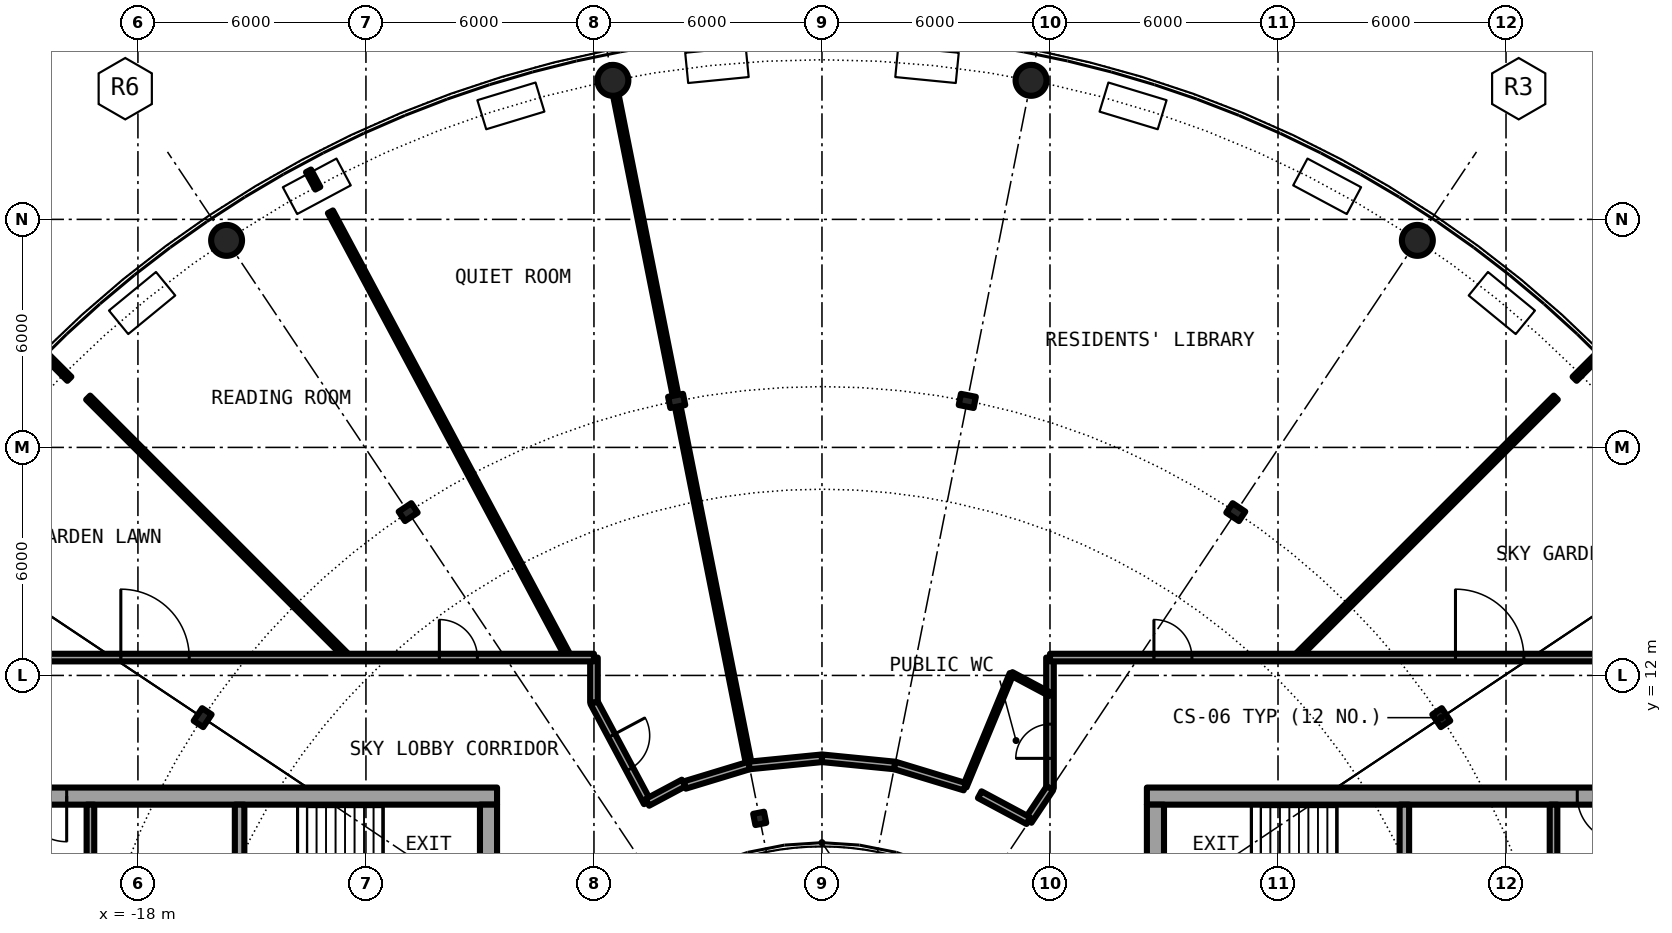
"""IFC4 building model, lengths in metres.
Left out: names, types, materials, properties, quantities, classifications, styles, units other than length and angle.
Written with IfcOpenShell. Run it as: python <this file> out.ifc"""

import sys

from ifc_helpers import new_model, si_unit, direction, frame, frame_2d, origin, origin_2d, place, context, subcontext, project, spatial, rectangle, hollow_circle, i_section, extrude, element, fill, save


model = new_model("IFC4")
c1 = context("Model", 3, precision=1e-05, world=origin(), true_north=direction((0.0, 1.0)))
c2 = subcontext(c1, "Body", "Model", "MODEL_VIEW")
j1 = project(units=[si_unit("LENGTHUNIT", "METRE"), si_unit("PLANEANGLEUNIT", "RADIAN")], contexts=[c1])
p1 = place(None, origin())
s1 = spatial("IfcSite", under=j1, at=p1, CompositionType="ELEMENT")
p2 = place(p1, origin())
s2 = spatial("IfcBuilding", under=s1, at=p2, CompositionType="ELEMENT")
p3 = place(p2, frame((0.0, 0.0, 221.85)))
s3 = spatial("IfcBuildingStorey", under=s2, at=p3, CompositionType="ELEMENT", Elevation=221.85)
for number, where, z_axis, x_axis in (
    (1, (15.667, 23.448, 0.0), (0.0, 0.0, 1.0), (1.0, 0.0, 0.0)),
    (2, (5.501, 27.658, 0.0), (0.0, 0.0, 1.0), (1.0, 0.0, 0.0)),
    (3, (-5.501, 27.658, 0.0), (0.0, 0.0, 1.0), (1.0, 0.0, 0.0)),
    (4, (-15.667, 23.448, 0.0), (0.0, 0.0, 1.0), (1.0, 0.0, 0.0)),
):
    element("IfcColumn", number, at=place(p3, frame(where, z_axis=z_axis, x_axis=x_axis)), inside=s3, PredefinedType="COLUMN", context=c2, shape_type="SweptSolid", body=[
        extrude(hollow_circle(Radius=0.406, WallThickness=0.03, at=origin_2d()), origin(), (0.0, 0.0, 1.0), 6.1),
    ])
for number, where, z_axis, x_axis in (
    (5, (16.297, 10.889, 0.0), (0.0, 0.0, 1.0), (0.831, 0.556, 0.0)),
    (6, (10.889, 16.297, 0.0), (0.0, 0.0, 1.0), (0.556, 0.831, 0.0)),
    (7, (3.824, 19.223, 0.0), (0.0, 0.0, 1.0), (0.195, 0.981, 0.0)),
    (8, (-3.824, 19.223, 0.0), (0.0, 0.0, 1.0), (-0.195, 0.981, 0.0)),
    (9, (-10.889, 16.297, 0.0), (0.0, 0.0, 1.0), (-0.556, 0.831, 0.0)),
    (10, (-16.297, 10.889, 0.0), (0.0, 0.0, 1.0), (-0.831, 0.556, 0.0)),
):
    element("IfcColumn", number, at=place(p3, frame(where, z_axis=z_axis, x_axis=x_axis)), inside=s3, PredefinedType="COLUMN", context=c2, shape_type="SweptSolid", body=[
        extrude(i_section(OverallWidth=0.3, OverallDepth=0.4, WebThickness=0.013, FlangeThickness=0.024, FilletRadius=0.027, at=origin_2d()), origin(), (0.0, 0.0, 1.0), 6.1),
    ])
p4 = place(p3, frame((-1.639, 8.239, 0.0), z_axis=(0.0, 0.0, 1.0), x_axis=(-0.195090322016, 0.980785280403, 0.0)))
e11 = element("IfcColumn", 11, at=p4, inside=s3, PredefinedType="COLUMN", context=c2, shape_type="SweptSolid", body=[
    extrude(i_section(OverallWidth=0.3, OverallDepth=0.29, WebThickness=0.009, FlangeThickness=0.014, FilletRadius=0.027, at=origin_2d()), origin(), (0.0, 0.0, 1.0), 6.1),
])
p5 = place(p3, frame((22.05, 8.825, 0.0), z_axis=(0.0, 0.0, 1.0), x_axis=(-1.0, 0.0, 0.0)))
e12 = element("IfcWall", 12, at=p5, inside=s3, PredefinedType="SHEAR", context=c2, shape_type="SweptSolid", body=[
    extrude(rectangle(XDim=13.5, YDim=0.45, at=frame_2d((6.75, 0.0))), origin(), (0.0, 0.0, 1.0), 6.1),
])
p6 = place(p5, frame((0.975, 0.0, 0.0)))
e13 = element("IfcOpeningElement", 13, at=p6, cuts=e12, PredefinedType="OPENING", context=c2, shape_type="SweptSolid", body=[
    extrude(rectangle(XDim=1.2, YDim=2.3, at=frame_2d((0.6, 1.15))), frame((0.0, 0.235, 0.0), z_axis=(0.0, -1.0, 0.0), x_axis=(1.0, 0.0, 0.0)), (0.0, 0.0, 1.0), 0.47),
])
p7 = place(p3, frame((8.775, -8.6, 0.0), z_axis=(0.0, 0.0, 1.0), x_axis=(0.0, 1.0, 0.0)))
e14 = element("IfcWall", 14, at=p7, inside=s3, PredefinedType="SHEAR", context=c2, shape_type="SweptSolid", body=[
    extrude(rectangle(XDim=17.2, YDim=0.45, at=frame_2d((8.6, 0.0))), origin(), (0.0, 0.0, 1.0), 6.1),
])
p8 = place(p7, frame((7.4, 0.0, 0.1)))
e15 = element("IfcOpeningElement", 15, at=p8, cuts=e14, PredefinedType="OPENING", context=c2, shape_type="SweptSolid", body=[
    extrude(rectangle(XDim=2.4, YDim=2.2, at=frame_2d((1.2, 1.1))), frame((0.0, 0.235, 0.0), z_axis=(0.0, -1.0, 0.0), x_axis=(1.0, 0.0, 0.0)), (0.0, 0.0, 1.0), 0.47),
])
p9 = place(p3, frame((15.325, 4.65, 0.0), z_axis=(0.0, 0.0, 1.0), x_axis=(0.0, 1.0, 0.0)))
e16 = element("IfcWall", 16, at=p9, inside=s3, PredefinedType="SHEAR", context=c2, shape_type="SweptSolid", body=[
    extrude(rectangle(XDim=3.95, YDim=0.25, at=frame_2d((1.975, 0.0))), origin(), (0.0, 0.0, 1.0), 6.1),
])
p10 = place(p9, frame((1.375, 0.0, 0.0)))
e17 = element("IfcOpeningElement", 17, at=p10, cuts=e16, PredefinedType="OPENING", context=c2, shape_type="SweptSolid", body=[
    extrude(rectangle(XDim=1.2, YDim=2.3, at=frame_2d((0.6, 1.15))), frame((0.0, 0.135, 0.0), z_axis=(0.0, -1.0, 0.0), x_axis=(1.0, 0.0, 0.0)), (0.0, 0.0, 1.0), 0.27),
])
p11 = place(p3, frame((19.25, 1.575, 0.0), z_axis=(0.0, 0.0, 1.0), x_axis=(0.0, 1.0, 0.0)))
e18 = element("IfcWall", 18, at=p11, inside=s3, PredefinedType="SOLIDWALL", context=c2, shape_type="SweptSolid", body=[
    extrude(rectangle(XDim=7.025, YDim=0.2, at=frame_2d((3.513, 0.0))), origin(), (0.0, 0.0, 1.0), 5.75),
])
p12 = place(p11, frame((4.475, 0.0, 0.0)))
e19 = element("IfcOpeningElement", 19, at=p12, cuts=e18, PredefinedType="OPENING", context=c2, shape_type="SweptSolid", body=[
    extrude(rectangle(XDim=1.1, YDim=2.3, at=frame_2d((0.55, 1.15))), frame((0.0, 0.11, 0.0), z_axis=(0.0, -1.0, 0.0), x_axis=(1.0, 0.0, 0.0)), (0.0, 0.0, 1.0), 0.22),
])
p13 = place(p3, frame((-8.55, 8.825, 0.0), z_axis=(0.0, 0.0, 1.0), x_axis=(-1.0, 0.0, 0.0)))
e20 = element("IfcWall", 20, at=p13, inside=s3, PredefinedType="SHEAR", context=c2, shape_type="SweptSolid", body=[
    extrude(rectangle(XDim=13.5, YDim=0.45, at=frame_2d((6.75, 0.0))), origin(), (0.0, 0.0, 1.0), 6.1),
])
p14 = place(p13, frame((11.325, 0.0, 0.0)))
e21 = element("IfcOpeningElement", 21, at=p14, cuts=e20, PredefinedType="OPENING", context=c2, shape_type="SweptSolid", body=[
    extrude(rectangle(XDim=1.2, YDim=2.3, at=frame_2d((0.6, 1.15))), frame((0.0, 0.235, 0.0), z_axis=(0.0, -1.0, 0.0), x_axis=(1.0, 0.0, 0.0)), (0.0, 0.0, 1.0), 0.47),
])
p15 = place(p3, frame((-8.775, 8.6, 0.0), z_axis=(0.0, 0.0, 1.0), x_axis=(0.0, -1.0, 0.0)))
e22 = element("IfcWall", 22, at=p15, inside=s3, PredefinedType="SHEAR", context=c2, shape_type="SweptSolid", body=[
    extrude(rectangle(XDim=17.2, YDim=0.45, at=frame_2d((8.6, 0.0))), origin(), (0.0, 0.0, 1.0), 6.1),
])
p16 = place(p15, frame((7.4, 0.0, 0.1)))
e23 = element("IfcOpeningElement", 23, at=p16, cuts=e22, PredefinedType="OPENING", context=c2, shape_type="SweptSolid", body=[
    extrude(rectangle(XDim=2.4, YDim=2.2, at=frame_2d((1.2, 1.1))), frame((0.0, 0.235, 0.0), z_axis=(0.0, -1.0, 0.0), x_axis=(1.0, 0.0, 0.0)), (0.0, 0.0, 1.0), 0.47),
])
p17 = place(p3, frame((-15.325, 8.6, 0.0), z_axis=(0.0, 0.0, 1.0), x_axis=(0.0, -1.0, 0.0)))
e24 = element("IfcWall", 24, at=p17, inside=s3, PredefinedType="SHEAR", context=c2, shape_type="SweptSolid", body=[
    extrude(rectangle(XDim=3.95, YDim=0.25, at=frame_2d((1.975, 0.0))), origin(), (0.0, 0.0, 1.0), 6.1),
])
p18 = place(p17, frame((2.025, 0.0, 0.0)))
e25 = element("IfcOpeningElement", 25, at=p18, cuts=e24, PredefinedType="OPENING", context=c2, shape_type="SweptSolid", body=[
    extrude(rectangle(XDim=1.2, YDim=2.3, at=frame_2d((0.6, 1.15))), frame((0.0, 0.135, 0.0), z_axis=(0.0, -1.0, 0.0), x_axis=(1.0, 0.0, 0.0)), (0.0, 0.0, 1.0), 0.27),
])
p19 = place(p3, frame((-19.25, 8.6, 0.0), z_axis=(0.0, 0.0, 1.0), x_axis=(0.0, -1.0, 0.0)))
e26 = element("IfcWall", 26, at=p19, inside=s3, PredefinedType="SOLIDWALL", context=c2, shape_type="SweptSolid", body=[
    extrude(rectangle(XDim=7.025, YDim=0.2, at=frame_2d((3.513, 0.0))), origin(), (0.0, 0.0, 1.0), 5.75),
])
p20 = place(p19, frame((2.35, 0.0, 0.0)))
e27 = element("IfcOpeningElement", 27, at=p20, cuts=e26, PredefinedType="OPENING", context=c2, shape_type="SweptSolid", body=[
    extrude(rectangle(XDim=1.1, YDim=2.3, at=frame_2d((0.55, 1.15))), frame((0.0, 0.11, 0.0), z_axis=(0.0, -1.0, 0.0), x_axis=(1.0, 0.0, 0.0)), (0.0, 0.0, 1.0), 0.22),
])
p21 = place(p3, frame((6.0, 9.034, 0.0), z_axis=(0.0, 0.0, 1.0), x_axis=(0.0, 1.0, 0.0)))
e28 = element("IfcWall", 28, at=p21, inside=s3, PredefinedType="PARTITIONING", context=c2, shape_type="SweptSolid", body=[
    extrude(rectangle(XDim=3.436, YDim=0.2, at=frame_2d((1.718, 0.0))), origin(), (0.0, 0.0, 1.0), 5.75),
])
p22 = place(p21, frame((0.784, 0.0, 0.0)))
e29 = element("IfcOpeningElement", 29, at=p22, cuts=e28, PredefinedType="OPENING", context=c2, shape_type="SweptSolid", body=[
    extrude(rectangle(XDim=0.9, YDim=2.3, at=frame_2d((0.45, 1.15))), frame((0.0, 0.11, 0.0), z_axis=(0.0, -1.0, 0.0), x_axis=(1.0, 0.0, 0.0)), (0.0, 0.0, 1.0), 0.22),
])
p23 = place(p3, frame((-13.511, 25.277, 0.0), z_axis=(0.0, 0.0, 1.0), x_axis=(0.470808368579, -0.882235501482, 0.0)))
e30 = element("IfcWall", 30, at=p23, inside=s3, PredefinedType="PARTITIONING", context=c2, shape_type="SweptSolid", body=[
    extrude(rectangle(XDim=0.518, YDim=0.15, at=frame_2d((0.259, 0.0))), origin(), (0.0, 0.0, 1.0), 5.75),
])
p24 = place(p3, frame((-20.365, 20.365, 0.0), z_axis=(0.0, 0.0, 1.0), x_axis=(0.707106781187, -0.707106781187, 0.0)))
e31 = element("IfcWall", 31, at=p24, inside=s3, PredefinedType="PARTITIONING", context=c2, shape_type="SweptSolid", body=[
    extrude(rectangle(XDim=0.792, YDim=0.15, at=frame_2d((0.396, 0.0))), origin(), (0.0, 0.0, 1.0), 5.75),
])
p25 = place(p3, frame((-19.31, 19.31, 0.0), z_axis=(0.0, 0.0, 1.0), x_axis=(0.707106781187, -0.707106781187, 0.0)))
e32 = element("IfcWall", 32, at=p25, inside=s3, PredefinedType="PARTITIONING", context=c2, shape_type="SweptSolid", body=[
    extrude(rectangle(XDim=9.673, YDim=0.15, at=frame_2d((4.837, 0.0))), origin(), (0.0, 0.0, 1.0), 5.75),
])
p26 = place(p3, frame((-12.935, 24.2, 0.0), z_axis=(0.0, 0.0, 1.0), x_axis=(0.471409271211, -0.881914564465, 0.0)))
e33 = element("IfcWall", 33, at=p26, inside=s3, PredefinedType="PARTITIONING", context=c2, shape_type="SweptSolid", body=[
    extrude(rectangle(XDim=13.301, YDim=0.15, at=frame_2d((6.65, 0.0))), origin(), (0.0, 0.0, 1.0), 5.75),
])
p27 = place(p3, frame((-5.424, 27.267, 0.0), z_axis=(0.0, 0.0, 1.0), x_axis=(0.195106720959, -0.980782018308, 0.0)))
e34 = element("IfcWall", 34, at=p27, inside=s3, PredefinedType="PARTITIONING", context=c2, shape_type="SweptSolid", body=[
    extrude(rectangle(XDim=8.001, YDim=0.15, at=frame_2d((4.0, 0.0))), origin(), (0.0, 0.0, 1.0), 5.75),
])
p28 = place(p3, frame((-3.785, 19.027, 0.0), z_axis=(0.0, 0.0, 1.0), x_axis=(0.195081953533, -0.980786944961, 0.0)))
e35 = element("IfcWall", 35, at=p28, inside=s3, PredefinedType="PARTITIONING", context=c2, shape_type="SweptSolid", body=[
    extrude(rectangle(XDim=9.58, YDim=0.15, at=frame_2d((4.79, 0.0))), origin(), (0.0, 0.0, 1.0), 5.75),
])
p29 = place(p3, frame((3.757, 9.073, 0.0), z_axis=(0.0, 0.0, 1.0), x_axis=(0.382624570991, 0.923903911494, 0.0)))
e36 = element("IfcWall", 36, at=p29, inside=s3, PredefinedType="PARTITIONING", context=c2, shape_type="SweptSolid", body=[
    extrude(rectangle(XDim=3.215, YDim=0.1, at=frame_2d((1.607, 0.0))), origin(), (0.0, 0.0, 1.0), 5.75),
])
p30 = place(p3, frame((12.47, 12.47, 0.0), z_axis=(0.0, 0.0, 1.0), x_axis=(0.707106781187, 0.707106781187, 0.0)))
e37 = element("IfcWall", 37, at=p30, inside=s3, PredefinedType="PARTITIONING", context=c2, shape_type="SweptSolid", body=[
    extrude(rectangle(XDim=9.673, YDim=0.15, at=frame_2d((4.837, 0.0))), origin(), (0.0, 0.0, 1.0), 5.75),
])
p31 = place(p3, frame((19.805, 19.805, 0.0), z_axis=(0.0, 0.0, 1.0), x_axis=(0.707106781187, 0.707106781187, 0.0)))
e38 = element("IfcWall", 38, at=p31, inside=s3, PredefinedType="PARTITIONING", context=c2, shape_type="SweptSolid", body=[
    extrude(rectangle(XDim=0.792, YDim=0.15, at=frame_2d((0.396, 0.0))), origin(), (0.0, 0.0, 1.0), 5.75),
])
p32 = place(p3, frame((-6.0, 11.289, 0.0), z_axis=(0.0, 0.0, 1.0), x_axis=(0.471323454276, -0.881960430773, 0.0)))
e39 = element("IfcWall", 39, at=p32, inside=s3, PredefinedType="PARTITIONING", context=c2, shape_type="SweptSolid", body=[
    extrude(rectangle(XDim=2.981, YDim=0.2, at=frame_2d((1.49, 0.0))), origin(), (0.0, 0.0, 1.0), 5.75),
])
p33 = place(p32, frame((0.99, 0.0, 0.0)))
e40 = element("IfcOpeningElement", 40, at=p33, cuts=e39, PredefinedType="OPENING", context=c2, shape_type="SweptSolid", body=[
    extrude(rectangle(XDim=1.0, YDim=2.3, at=frame_2d((0.5, 1.15))), frame((0.0, 0.11, 0.0), z_axis=(0.0, -1.0, 0.0), x_axis=(1.0, 0.0, 0.0)), (0.0, 0.0, 1.0), 0.22),
])
p34 = place(p3, frame((5.429, 8.179, 0.0), z_axis=(0.0, 0.0, 1.0), x_axis=(0.555412364489, 0.831575075007, 0.0)))
e41 = element("IfcWall", 41, at=p34, inside=s3, PredefinedType="PARTITIONING", context=c2, shape_type="SweptSolid", body=[
    extrude(rectangle(XDim=1.028, YDim=0.2, at=frame_2d((0.514, 0.0))), origin(), (0.0, 0.0, 1.0), 5.75),
])
p35 = place(p3, frame((-6.0, 11.289, 0.0), z_axis=(0.0, 0.0, 1.0), x_axis=(0.0, 1.0, 0.0)))
e42 = element("IfcWall", 42, at=p35, inside=s3, PredefinedType="PARTITIONING", context=c2, shape_type="SweptSolid", body=[
    extrude(rectangle(XDim=1.181, YDim=0.2, at=frame_2d((0.59, 0.0))), origin(), (0.0, 0.0, 1.0), 5.75),
])
p36 = place(p3, frame((-3.612, 9.116, 0.0), z_axis=(0.0, 0.0, 1.0), x_axis=(0.956838864513, 0.290618972812, 0.0)))
e43 = element("IfcWall", 43, at=p36, inside=s3, PredefinedType="PARTITIONING", context=c2, shape_type="SweptSolid", body=[
    extrude(rectangle(XDim=1.772, YDim=0.2, at=frame_2d((0.886, 0.0))), origin(), (0.0, 0.0, 1.0), 5.75),
])
for number, where, z_axis, x_axis in (
    (44, (-1.916, 9.631, 0.0), (0.0, 0.0, 1.0), (0.995, 0.098, 0.0)),
    (45, (0.0, 9.82, 0.0), (0.0, 0.0, 1.0), (0.995, -0.098, 0.0)),
):
    element("IfcWall", number, at=place(p3, frame(where, z_axis=z_axis, x_axis=x_axis)), inside=s3, PredefinedType="PARTITIONING", context=c2, shape_type="SweptSolid", body=[
        extrude(rectangle(XDim=1.925, YDim=0.2, at=frame_2d((0.963, 0.0))), origin(), (0.0, 0.0, 1.0), 5.75),
    ])
p37 = place(p3, frame((1.916, 9.631, 0.0), z_axis=(0.0, 0.0, 1.0), x_axis=(0.956896312675, -0.29042976223, 0.0)))
e46 = element("IfcWall", 46, at=p37, inside=s3, PredefinedType="PARTITIONING", context=c2, shape_type="SweptSolid", body=[
    extrude(rectangle(XDim=1.925, YDim=0.2, at=frame_2d((0.962, 0.0))), origin(), (0.0, 0.0, 1.0), 5.75),
])
p38 = place(p3, frame((4.151, 8.863, 0.0), z_axis=(0.0, 0.0, 1.0), x_axis=(0.881652665802, -0.471898905364, 0.0)))
e47 = element("IfcWall", 47, at=p38, inside=s3, PredefinedType="PARTITIONING", context=c2, shape_type="SweptSolid", body=[
    extrude(rectangle(XDim=1.45, YDim=0.2, at=frame_2d((0.725, 0.0))), origin(), (0.0, 0.0, 1.0), 5.75),
])
p39 = place(p3, frame((-4.595, 8.66, 0.0), z_axis=(0.0, 0.0, 1.0), x_axis=(0.882484042169, 0.470342338426, 0.0)))
e48 = element("IfcWall", 48, at=p39, inside=s3, PredefinedType="PARTITIONING", context=c2, shape_type="SweptSolid", body=[
    extrude(rectangle(XDim=1.082, YDim=0.2, at=frame_2d((0.541, 0.0))), origin(), (0.0, 0.0, 1.0), 5.75),
])
p40 = place(p3, frame((-21.9, 12.47, 0.0), z_axis=(0.0, 0.0, 1.0), x_axis=(1.0, 0.0, 0.0)))
e49 = element("IfcWall", 49, at=p40, inside=s3, PredefinedType="PARTITIONING", context=c2, shape_type="SweptSolid", body=[
    extrude(rectangle(XDim=15.9, YDim=0.2, at=frame_2d((7.95, 0.0))), origin(), (0.0, 0.0, 1.0), 5.75),
])
p41 = place(p40, frame((11.832, 0.0, 0.0)))
e50 = element("IfcOpeningElement", 50, at=p41, cuts=e49, PredefinedType="OPENING", context=c2, shape_type="SweptSolid", body=[
    extrude(rectangle(XDim=1.0, YDim=2.3, at=frame_2d((0.5, 1.15))), frame((0.0, 0.11, 0.0), z_axis=(0.0, -1.0, 0.0), x_axis=(1.0, 0.0, 0.0)), (0.0, 0.0, 1.0), 0.22),
])
p42 = place(p40, frame((3.45, 0.0, 0.0)))
e51 = element("IfcOpeningElement", 51, at=p42, cuts=e49, PredefinedType="OPENING", context=c2, shape_type="SweptSolid", body=[
    extrude(rectangle(XDim=1.8, YDim=2.3, at=frame_2d((0.9, 1.15))), frame((0.0, 0.11, 0.0), z_axis=(0.0, -1.0, 0.0), x_axis=(1.0, 0.0, 0.0)), (0.0, 0.0, 1.0), 0.22),
])
p43 = place(p3, frame((6.0, 12.47, 0.0), z_axis=(0.0, 0.0, 1.0), x_axis=(1.0, 0.0, 0.0)))
e52 = element("IfcWall", 52, at=p43, inside=s3, PredefinedType="PARTITIONING", context=c2, shape_type="SweptSolid", body=[
    extrude(rectangle(XDim=15.9, YDim=0.2, at=frame_2d((7.95, 0.0))), origin(), (0.0, 0.0, 1.0), 5.75),
])
p44 = place(p43, frame((2.735, 0.0, 0.0)))
e53 = element("IfcOpeningElement", 53, at=p44, cuts=e52, PredefinedType="OPENING", context=c2, shape_type="SweptSolid", body=[
    extrude(rectangle(XDim=1.0, YDim=2.3, at=frame_2d((0.5, 1.15))), frame((0.0, 0.11, 0.0), z_axis=(0.0, -1.0, 0.0), x_axis=(1.0, 0.0, 0.0)), (0.0, 0.0, 1.0), 0.22),
])
p45 = place(p43, frame((10.67, 0.0, 0.0)))
e54 = element("IfcOpeningElement", 54, at=p45, cuts=e52, PredefinedType="OPENING", context=c2, shape_type="SweptSolid", body=[
    extrude(rectangle(XDim=1.8, YDim=2.3, at=frame_2d((0.9, 1.15))), frame((0.0, 0.11, 0.0), z_axis=(0.0, -1.0, 0.0), x_axis=(1.0, 0.0, 0.0)), (0.0, 0.0, 1.0), 0.22),
])
p46 = place(p3, frame((4.988, 12.043, 0.0), z_axis=(0.0, 0.0, 1.0), x_axis=(0.882235076446, -0.470809165042, 0.0)))
e55 = element("IfcWall", 55, at=p46, inside=s3, PredefinedType="PARTITIONING", context=c2, shape_type="SweptSolid", body=[
    extrude(rectangle(XDim=1.147, YDim=0.1, at=frame_2d((0.573, 0.0))), origin(), (0.0, 0.0, 1.0), 5.75),
])
p47 = place(p6, origin())
e56 = element("IfcDoor", 56, at=p47, inside=s3, OperationType="SINGLE_SWING_RIGHT", PredefinedType="DOOR", context=c2, shape_type="SweptSolid", body=[
    extrude(rectangle(XDim=1.2, YDim=2.3, at=frame_2d((0.6, 1.15))), frame((0.0, 0.025, 0.0), z_axis=(0.0, -1.0, 0.0), x_axis=(1.0, 0.0, 0.0)), (0.0, 0.0, 1.0), 0.05),
])
fill(e13, e56)
p48 = place(p14, origin())
e57 = element("IfcDoor", 57, at=p48, inside=s3, OperationType="SINGLE_SWING_LEFT", PredefinedType="DOOR", context=c2, shape_type="SweptSolid", body=[
    extrude(rectangle(XDim=1.2, YDim=2.3, at=frame_2d((0.6, 1.15))), frame((0.0, 0.025, 0.0), z_axis=(0.0, -1.0, 0.0), x_axis=(1.0, 0.0, 0.0)), (0.0, 0.0, 1.0), 0.05),
])
fill(e21, e57)
p49 = place(p22, origin())
e58 = element("IfcDoor", 58, at=p49, inside=s3, OperationType="SINGLE_SWING_LEFT", PredefinedType="DOOR", context=c2, shape_type="SweptSolid", body=[
    extrude(rectangle(XDim=0.9, YDim=2.3, at=frame_2d((0.45, 1.15))), frame((0.0, 0.025, 0.0), z_axis=(0.0, -1.0, 0.0), x_axis=(1.0, 0.0, 0.0)), (0.0, 0.0, 1.0), 0.05),
])
fill(e29, e58)
p50 = place(p44, origin())
e59 = element("IfcDoor", 59, at=p50, inside=s3, OperationType="SINGLE_SWING_LEFT", PredefinedType="DOOR", context=c2, shape_type="SweptSolid", body=[
    extrude(rectangle(XDim=1.0, YDim=2.3, at=frame_2d((0.5, 1.15))), frame((0.0, 0.025, 0.0), z_axis=(0.0, -1.0, 0.0), x_axis=(1.0, 0.0, 0.0)), (0.0, 0.0, 1.0), 0.05),
])
fill(e53, e59)
p51 = place(p33, origin())
e60 = element("IfcDoor", 60, at=p51, inside=s3, OperationType="SINGLE_SWING_RIGHT", PredefinedType="DOOR", context=c2, shape_type="SweptSolid", body=[
    extrude(rectangle(XDim=1.0, YDim=2.3, at=frame_2d((0.5, 1.15))), frame((0.0, 0.025, 0.0), z_axis=(0.0, -1.0, 0.0), x_axis=(1.0, 0.0, 0.0)), (0.0, 0.0, 1.0), 0.05),
])
fill(e40, e60)
p52 = place(p41, origin())
e61 = element("IfcDoor", 61, at=p52, inside=s3, OperationType="SINGLE_SWING_RIGHT", PredefinedType="DOOR", context=c2, shape_type="SweptSolid", body=[
    extrude(rectangle(XDim=1.0, YDim=2.3, at=frame_2d((0.5, 1.15))), frame((0.0, 0.025, 0.0), z_axis=(0.0, -1.0, 0.0), x_axis=(1.0, 0.0, 0.0)), (0.0, 0.0, 1.0), 0.05),
])
fill(e50, e61)
p53 = place(p45, origin())
e62 = element("IfcDoor", 62, at=p53, inside=s3, OperationType="DOUBLE_DOOR_SINGLE_SWING", PredefinedType="DOOR", context=c2, shape_type="SweptSolid", body=[
    extrude(rectangle(XDim=1.8, YDim=2.3, at=frame_2d((0.9, 1.15))), frame((0.0, 0.025, 0.0), z_axis=(0.0, -1.0, 0.0), x_axis=(1.0, 0.0, 0.0)), (0.0, 0.0, 1.0), 0.05),
])
fill(e54, e62)
p54 = place(p42, origin())
e63 = element("IfcDoor", 63, at=p54, inside=s3, OperationType="DOUBLE_DOOR_SINGLE_SWING", PredefinedType="DOOR", context=c2, shape_type="SweptSolid", body=[
    extrude(rectangle(XDim=1.8, YDim=2.3, at=frame_2d((0.9, 1.15))), frame((0.0, 0.025, 0.0), z_axis=(0.0, -1.0, 0.0), x_axis=(1.0, 0.0, 0.0)), (0.0, 0.0, 1.0), 0.05),
])
fill(e51, e63)
save(model, sys.argv[1])
